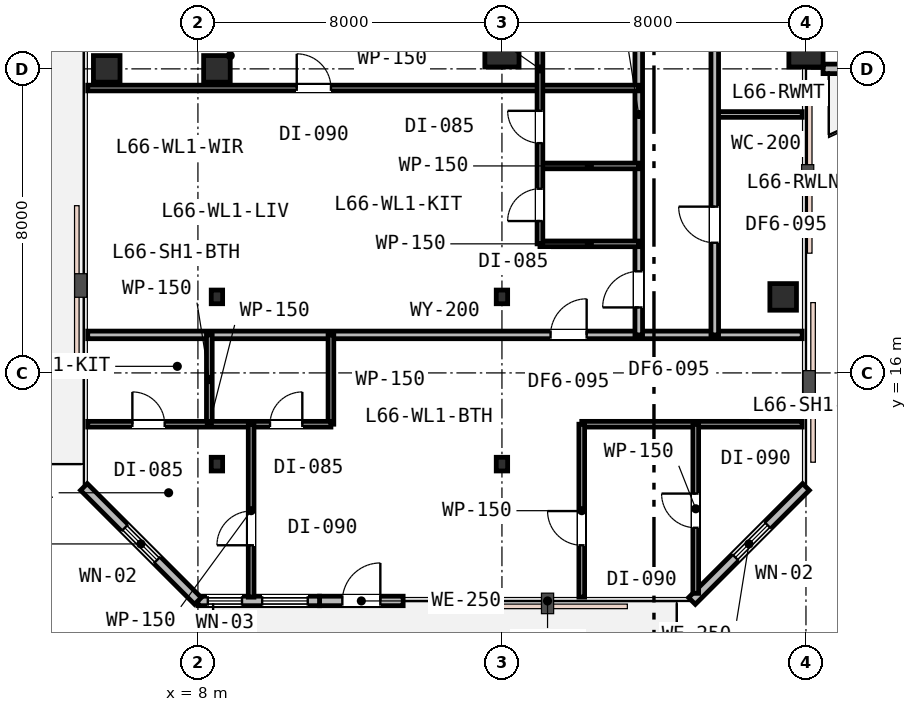
"""IFC4 building model, lengths in metres.
Left out: names, types, materials, properties, quantities, classifications, styles, units other than length and angle.
Written with IfcOpenShell. Run it as: python <this file> out.ifc"""

import sys

from ifc_helpers import new_model, si_unit, direction, frame, frame_2d, origin, origin_2d, place, context, subcontext, project, spatial, rectangle, i_section, extrude, element, fill, save


model = new_model("IFC4")
c1 = context("Model", 3, precision=1e-05, world=origin(), true_north=direction((0.0, 1.0)))
c2 = subcontext(c1, "Body", "Model", "MODEL_VIEW")
j1 = project(units=[si_unit("LENGTHUNIT", "METRE"), si_unit("PLANEANGLEUNIT", "RADIAN")], contexts=[c1])
p1 = place(None, origin())
s1 = spatial("IfcSite", under=j1, at=p1, CompositionType="ELEMENT")
p2 = place(p1, origin())
s2 = spatial("IfcBuilding", under=s1, at=p2, CompositionType="ELEMENT")
p3 = place(p2, frame((0.0, 0.0, 256.4)))
s3 = spatial("IfcBuildingStorey", under=s2, at=p3, CompositionType="ELEMENT", Elevation=256.4)
p4 = place(p3, frame((8.5, 24.0, 0.0), z_axis=(0.0, 0.0, 1.0), x_axis=(1.0, 0.0, 0.0)))
e1 = element("IfcColumn", 1, at=p4, inside=s3, PredefinedType="COLUMN", context=c2, shape_type="SweptSolid", body=[
    extrude(rectangle(XDim=0.7, YDim=0.7, at=origin_2d()), origin(), (0.0, 0.0, 1.0), 3.8),
])
for number, where, z_axis, x_axis in (
    (2, (16.0, 24.5, 0.0), (0.0, 0.0, 1.0), (1.0, 0.0, 0.0)),
    (3, (24.0, 24.5, 0.0), (0.0, 0.0, 1.0), (1.0, 0.0, 0.0)),
):
    element("IfcColumn", number, at=place(p3, frame(where, z_axis=z_axis, x_axis=x_axis)), inside=s3, PredefinedType="COLUMN", context=c2, shape_type="SweptSolid", body=[
        extrude(rectangle(XDim=0.9, YDim=0.9, at=origin_2d()), origin(), (0.0, 0.0, 1.0), 3.8),
    ])
for number, where, z_axis, x_axis in (
    (4, (5.6, 24.0, 0.0), (0.0, 0.0, 1.0), (1.0, 0.0, 0.0)),
    (5, (23.4, 18.0, 0.0), (0.0, 0.0, 1.0), (1.0, 0.0, 0.0)),
):
    element("IfcColumn", number, at=place(p3, frame(where, z_axis=z_axis, x_axis=x_axis)), inside=s3, PredefinedType="COLUMN", context=c2, shape_type="SweptSolid", body=[
        extrude(rectangle(XDim=0.7, YDim=0.7, at=origin_2d()), origin(), (0.0, 0.0, 1.0), 3.8),
    ])
for number, where, z_axis, x_axis in (
    (6, (8.5, 13.6, 0.0), (0.0, 0.0, 1.0), (1.0, 0.0, 0.0)),
    (7, (16.0, 13.6, 0.0), (0.0, 0.0, 1.0), (1.0, 0.0, 0.0)),
    (8, (8.5, 18.0, 0.0), (0.0, 0.0, 1.0), (1.0, 0.0, 0.0)),
    (9, (16.0, 18.0, 0.0), (0.0, 0.0, 1.0), (1.0, 0.0, 0.0)),
):
    element("IfcColumn", number, at=place(p3, frame(where, z_axis=z_axis, x_axis=x_axis)), inside=s3, PredefinedType="COLUMN", context=c2, shape_type="SweptSolid", body=[
        extrude(i_section(OverallWidth=0.3, OverallDepth=0.36, WebThickness=0.013, FlangeThickness=0.022, FilletRadius=0.027, at=origin_2d()), origin(), (0.0, 0.0, 1.0), 3.8),
    ])
p5 = place(p3, frame((11.2, 10.0, 0.0), z_axis=(0.0, 0.0, 1.0), x_axis=(1.0, 0.0, 0.0)))
e10 = element("IfcWall", 10, at=p5, inside=s3, PredefinedType="STANDARD", context=c2, shape_type="SweptSolid", body=[
    extrude(rectangle(XDim=2.2, YDim=0.25, at=frame_2d((1.1, 0.0))), origin(), (0.0, 0.0, 1.0), 3.53),
])
p6 = place(p5, frame((0.6, 0.0, 0.0)))
e11 = element("IfcOpeningElement", 11, at=p6, cuts=e10, PredefinedType="OPENING", context=c2, shape_type="SweptSolid", body=[
    extrude(rectangle(XDim=1.0, YDim=2.15, at=frame_2d((0.5, 1.075))), frame((0.0, 0.135, 0.0), z_axis=(0.0, -1.0, 0.0), x_axis=(1.0, 0.0, 0.0)), (0.0, 0.0, 1.0), 0.27),
])
p7 = place(p3, frame((8.0, 10.0, 0.0), z_axis=(0.0, 0.0, 1.0), x_axis=(1.0, 0.0, 0.0)))
e12 = element("IfcWall", 12, at=p7, inside=s3, PredefinedType="STANDARD", context=c2, shape_type="SweptSolid", body=[
    extrude(rectangle(XDim=3.2, YDim=0.25, at=frame_2d((1.6, 0.0))), origin(), (0.0, 0.0, 1.0), 3.53),
])
p8 = place(p7, frame((0.26, 0.0, 0.9)))
e13 = element("IfcOpeningElement", 13, at=p8, cuts=e12, PredefinedType="OPENING", context=c2, shape_type="SweptSolid", body=[
    extrude(rectangle(XDim=0.9, YDim=1.55, at=frame_2d((0.45, 0.775))), frame((0.0, 0.135, 0.0), z_axis=(0.0, -1.0, 0.0), x_axis=(1.0, 0.0, 0.0)), (0.0, 0.0, 1.0), 0.27),
])
p9 = place(p7, frame((1.69, 0.0, 0.85)))
e14 = element("IfcOpeningElement", 14, at=p9, cuts=e12, PredefinedType="OPENING", context=c2, shape_type="SweptSolid", body=[
    extrude(rectangle(XDim=1.2, YDim=1.6, at=frame_2d((0.6, 0.8))), frame((0.0, 0.135, 0.0), z_axis=(0.0, -1.0, 0.0), x_axis=(1.0, 0.0, 0.0)), (0.0, 0.0, 1.0), 0.27),
])
p10 = place(p3, frame((21.0, 10.0, 0.0), z_axis=(0.0, 0.0, 1.0), x_axis=(0.707106781187, 0.707106781187, 0.0)))
e15 = element("IfcWall", 15, at=p10, inside=s3, PredefinedType="STANDARD", context=c2, shape_type="SweptSolid", body=[
    extrude(rectangle(XDim=4.243, YDim=0.25, at=frame_2d((2.121, 0.0))), origin(), (0.0, 0.0, 1.0), 3.53),
])
p11 = place(p10, frame((1.617, 0.0, 0.85)))
e16 = element("IfcOpeningElement", 16, at=p11, cuts=e15, PredefinedType="OPENING", context=c2, shape_type="SweptSolid", body=[
    extrude(rectangle(XDim=1.2, YDim=1.6, at=frame_2d((0.6, 0.8))), frame((0.0, 0.135, 0.0), z_axis=(0.0, -1.0, 0.0), x_axis=(1.0, 0.0, 0.0)), (0.0, 0.0, 1.0), 0.27),
])
p12 = place(p3, frame((24.45, 24.0, 0.0), z_axis=(0.0, 0.0, 1.0), x_axis=(1.0, 0.0, 0.0)))
e17 = element("IfcWall", 17, at=p12, inside=s3, PredefinedType="STANDARD", context=c2, shape_type="SweptSolid", body=[
    extrude(rectangle(XDim=0.95, YDim=0.25, at=frame_2d((0.475, 0.0))), origin(), (0.0, 0.0, 1.0), 3.27),
])
p13 = place(p3, frame((5.0, 13.0, 0.0), z_axis=(0.0, 0.0, 1.0), x_axis=(0.707106781187, -0.707106781187, 0.0)))
e18 = element("IfcWall", 18, at=p13, inside=s3, PredefinedType="STANDARD", context=c2, shape_type="SweptSolid", body=[
    extrude(rectangle(XDim=4.243, YDim=0.25, at=frame_2d((2.121, 0.0))), origin(), (0.0, 0.0, 1.0), 3.53),
])
p14 = place(p13, frame((1.521, 0.0, 0.85)))
e19 = element("IfcOpeningElement", 19, at=p14, cuts=e18, PredefinedType="OPENING", context=c2, shape_type="SweptSolid", body=[
    extrude(rectangle(XDim=1.2, YDim=1.6, at=frame_2d((0.6, 0.8))), frame((0.0, 0.135, 0.0), z_axis=(0.0, -1.0, 0.0), x_axis=(1.0, 0.0, 0.0)), (0.0, 0.0, 1.0), 0.27),
])
p15 = place(p3, frame((5.1, 17.0, 0.0), z_axis=(0.0, 0.0, 1.0), x_axis=(1.0, 0.0, 0.0)))
e20 = element("IfcWall", 20, at=p15, inside=s3, PredefinedType="PARTITIONING", context=c2, shape_type="SweptSolid", body=[
    extrude(rectangle(XDim=18.8, YDim=0.2, at=frame_2d((9.4, 0.0))), origin(), (0.0, 0.0, 1.0), 3.16),
])
p16 = place(p15, frame((12.179, 0.0, 0.0)))
e21 = element("IfcOpeningElement", 21, at=p16, cuts=e20, PredefinedType="OPENING", context=c2, shape_type="SweptSolid", body=[
    extrude(rectangle(XDim=0.95, YDim=2.15, at=frame_2d((0.475, 1.075))), frame((0.0, 0.11, 0.0), z_axis=(0.0, -1.0, 0.0), x_axis=(1.0, 0.0, 0.0)), (0.0, 0.0, 1.0), 0.22),
])
p17 = place(p3, frame((19.6, 17.0, 0.0), z_axis=(0.0, 0.0, 1.0), x_axis=(0.0, 1.0, 0.0)))
e22 = element("IfcWall", 22, at=p17, inside=s3, PredefinedType="PARTITIONING", context=c2, shape_type="SweptSolid", body=[
    extrude(rectangle(XDim=11.6, YDim=0.2, at=frame_2d((5.8, 0.0))), origin(), (0.0, 0.0, 1.0), 3.16),
])
p18 = place(p17, frame((0.723, 0.0, 0.0)))
e23 = element("IfcOpeningElement", 23, at=p18, cuts=e22, PredefinedType="OPENING", context=c2, shape_type="SweptSolid", body=[
    extrude(rectangle(XDim=0.95, YDim=2.15, at=frame_2d((0.475, 1.075))), frame((0.0, 0.11, 0.0), z_axis=(0.0, -1.0, 0.0), x_axis=(1.0, 0.0, 0.0)), (0.0, 0.0, 1.0), 0.22),
])
for number, where, z_axis, x_axis in (
    (24, (17.0, 19.396, 0.0), (0.0, 0.0, 1.0), (1.0, 0.0, 0.0)),
    (25, (17.0, 21.446, 0.0), (0.0, 0.0, 1.0), (1.0, 0.0, 0.0)),
):
    element("IfcWall", number, at=place(p3, frame(where, z_axis=z_axis, x_axis=x_axis)), inside=s3, PredefinedType="PARTITIONING", context=c2, shape_type="SweptSolid", body=[
        extrude(rectangle(XDim=2.6, YDim=0.15, at=frame_2d((1.3, 0.0))), origin(), (0.0, 0.0, 1.0), 3.53),
    ])
p19 = place(p3, frame((5.1, 23.496, 0.0), z_axis=(0.0, 0.0, 1.0), x_axis=(1.0, 0.0, 0.0)))
e26 = element("IfcWall", 26, at=p19, inside=s3, PredefinedType="PARTITIONING", context=c2, shape_type="SweptSolid", body=[
    extrude(rectangle(XDim=14.5, YDim=0.15, at=frame_2d((7.25, 0.0))), origin(), (0.0, 0.0, 1.0), 3.16),
])
p20 = place(p19, frame((5.5, 0.0, 0.0)))
e27 = element("IfcOpeningElement", 27, at=p20, cuts=e26, PredefinedType="OPENING", context=c2, shape_type="SweptSolid", body=[
    extrude(rectangle(XDim=0.9, YDim=2.15, at=frame_2d((0.45, 1.075))), frame((0.0, 0.085, 0.0), z_axis=(0.0, -1.0, 0.0), x_axis=(1.0, 0.0, 0.0)), (0.0, 0.0, 1.0), 0.17),
])
p21 = place(p3, frame((17.0, 19.396, 0.0), z_axis=(0.0, 0.0, 1.0), x_axis=(0.0, 1.0, 0.0)))
e28 = element("IfcWall", 28, at=p21, inside=s3, PredefinedType="PARTITIONING", context=c2, shape_type="SweptSolid", body=[
    extrude(rectangle(XDim=9.204, YDim=0.15, at=frame_2d((4.602, 0.0))), origin(), (0.0, 0.0, 1.0), 3.16),
])
p22 = place(p21, frame((0.6, 0.0, 0.0)))
e29 = element("IfcOpeningElement", 29, at=p22, cuts=e28, PredefinedType="OPENING", context=c2, shape_type="SweptSolid", body=[
    extrude(rectangle(XDim=0.85, YDim=2.15, at=frame_2d((0.425, 1.075))), frame((0.0, 0.085, 0.0), z_axis=(0.0, -1.0, 0.0), x_axis=(1.0, 0.0, 0.0)), (0.0, 0.0, 1.0), 0.17),
])
p23 = place(p21, frame((2.65, 0.0, 0.0)))
e30 = element("IfcOpeningElement", 30, at=p23, cuts=e28, PredefinedType="OPENING", context=c2, shape_type="SweptSolid", body=[
    extrude(rectangle(XDim=0.85, YDim=2.15, at=frame_2d((0.425, 1.075))), frame((0.0, 0.085, 0.0), z_axis=(0.0, -1.0, 0.0), x_axis=(1.0, 0.0, 0.0)), (0.0, 0.0, 1.0), 0.17),
])
p24 = place(p21, frame((6.593, 0.0, 0.0)))
e31 = element("IfcOpeningElement", 31, at=p24, cuts=e28, PredefinedType="OPENING", context=c2, shape_type="SweptSolid", body=[
    extrude(rectangle(XDim=0.85, YDim=2.15, at=frame_2d((0.425, 1.075))), frame((0.0, 0.085, 0.0), z_axis=(0.0, -1.0, 0.0), x_axis=(1.0, 0.0, 0.0)), (0.0, 0.0, 1.0), 0.17),
])
p25 = place(p3, frame((21.6, 22.8, 0.0), z_axis=(0.0, 0.0, 1.0), x_axis=(1.0, 0.0, 0.0)))
e32 = element("IfcWall", 32, at=p25, inside=s3, PredefinedType="PARTITIONING", context=c2, shape_type="SweptSolid", body=[
    extrude(rectangle(XDim=2.3, YDim=0.15, at=frame_2d((1.15, 0.0))), origin(), (0.0, 0.0, 1.0), 3.53),
])
p26 = place(p3, frame((21.6, 17.0, 0.0), z_axis=(0.0, 0.0, 1.0), x_axis=(0.0, 1.0, 0.0)))
e33 = element("IfcWall", 33, at=p26, inside=s3, PredefinedType="PARTITIONING", context=c2, shape_type="SweptSolid", body=[
    extrude(rectangle(XDim=11.6, YDim=0.2, at=frame_2d((5.8, 0.0))), origin(), (0.0, 0.0, 1.0), 3.16),
])
p27 = place(p26, frame((8.994, 0.0, 0.0)))
e34 = element("IfcOpeningElement", 34, at=p27, cuts=e33, PredefinedType="OPENING", context=c2, shape_type="SweptSolid", body=[
    extrude(rectangle(XDim=0.95, YDim=2.15, at=frame_2d((0.475, 1.075))), frame((0.0, 0.11, 0.0), z_axis=(0.0, -1.0, 0.0), x_axis=(1.0, 0.0, 0.0)), (0.0, 0.0, 1.0), 0.22),
])
p28 = place(p26, frame((2.425, 0.0, 0.0)))
e35 = element("IfcOpeningElement", 35, at=p28, cuts=e33, PredefinedType="OPENING", context=c2, shape_type="SweptSolid", body=[
    extrude(rectangle(XDim=0.95, YDim=2.15, at=frame_2d((0.475, 1.075))), frame((0.0, 0.11, 0.0), z_axis=(0.0, -1.0, 0.0), x_axis=(1.0, 0.0, 0.0)), (0.0, 0.0, 1.0), 0.22),
])
p29 = place(p3, frame((11.5, 14.65, 0.0), z_axis=(0.0, 0.0, 1.0), x_axis=(0.0, 1.0, 0.0)))
e36 = element("IfcWall", 36, at=p29, inside=s3, PredefinedType="PARTITIONING", context=c2, shape_type="SweptSolid", body=[
    extrude(rectangle(XDim=2.35, YDim=0.15, at=frame_2d((1.175, 0.0))), origin(), (0.0, 0.0, 1.0), 3.28),
])
p30 = place(p3, frame((8.3, 14.65, 0.0), z_axis=(0.0, 0.0, 1.0), x_axis=(0.0, 1.0, 0.0)))
e37 = element("IfcWall", 37, at=p30, inside=s3, PredefinedType="PARTITIONING", context=c2, shape_type="SweptSolid", body=[
    extrude(rectangle(XDim=2.35, YDim=0.15, at=frame_2d((1.175, 0.0))), origin(), (0.0, 0.0, 1.0), 3.16),
])
p31 = place(p3, frame((5.1, 14.65, 0.0), z_axis=(0.0, 0.0, 1.0), x_axis=(1.0, 0.0, 0.0)))
e38 = element("IfcWall", 38, at=p31, inside=s3, PredefinedType="PARTITIONING", context=c2, shape_type="SweptSolid", body=[
    extrude(rectangle(XDim=6.4, YDim=0.15, at=frame_2d((3.2, 0.0))), origin(), (0.0, 0.0, 1.0), 3.16),
])
p32 = place(p31, frame((1.175, 0.0, 0.0)))
e39 = element("IfcOpeningElement", 39, at=p32, cuts=e38, PredefinedType="OPENING", context=c2, shape_type="SweptSolid", body=[
    extrude(rectangle(XDim=0.85, YDim=2.15, at=frame_2d((0.425, 1.075))), frame((0.0, 0.085, 0.0), z_axis=(0.0, -1.0, 0.0), x_axis=(1.0, 0.0, 0.0)), (0.0, 0.0, 1.0), 0.17),
])
p33 = place(p31, frame((4.797, 0.0, 0.0)))
e40 = element("IfcOpeningElement", 40, at=p33, cuts=e38, PredefinedType="OPENING", context=c2, shape_type="SweptSolid", body=[
    extrude(rectangle(XDim=0.85, YDim=2.15, at=frame_2d((0.425, 1.075))), frame((0.0, 0.085, 0.0), z_axis=(0.0, -1.0, 0.0), x_axis=(1.0, 0.0, 0.0)), (0.0, 0.0, 1.0), 0.17),
])
p34 = place(p3, frame((18.1, 14.65, 0.0), z_axis=(0.0, 0.0, 1.0), x_axis=(1.0, 0.0, 0.0)))
e41 = element("IfcWall", 41, at=p34, inside=s3, PredefinedType="PARTITIONING", context=c2, shape_type="SweptSolid", body=[
    extrude(rectangle(XDim=5.8, YDim=0.15, at=frame_2d((2.9, 0.0))), origin(), (0.0, 0.0, 1.0), 3.53),
])
p35 = place(p3, frame((9.4, 10.1, 0.0), z_axis=(0.0, 0.0, 1.0), x_axis=(0.0, 1.0, 0.0)))
e42 = element("IfcWall", 42, at=p35, inside=s3, PredefinedType="PARTITIONING", context=c2, shape_type="SweptSolid", body=[
    extrude(rectangle(XDim=4.55, YDim=0.15, at=frame_2d((2.275, 0.0))), origin(), (0.0, 0.0, 1.0), 3.16),
])
p36 = place(p35, frame((1.365, 0.0, 0.0)))
e43 = element("IfcOpeningElement", 43, at=p36, cuts=e42, PredefinedType="OPENING", context=c2, shape_type="SweptSolid", body=[
    extrude(rectangle(XDim=0.9, YDim=2.15, at=frame_2d((0.45, 1.075))), frame((0.0, 0.085, 0.0), z_axis=(0.0, -1.0, 0.0), x_axis=(1.0, 0.0, 0.0)), (0.0, 0.0, 1.0), 0.17),
])
p37 = place(p3, frame((21.1, 10.2, 0.0), z_axis=(0.0, 0.0, 1.0), x_axis=(0.0, 1.0, 0.0)))
e44 = element("IfcWall", 44, at=p37, inside=s3, PredefinedType="PARTITIONING", context=c2, shape_type="SweptSolid", body=[
    extrude(rectangle(XDim=4.45, YDim=0.15, at=frame_2d((2.225, 0.0))), origin(), (0.0, 0.0, 1.0), 3.53),
])
p38 = place(p37, frame((1.725, 0.0, 0.0)))
e45 = element("IfcOpeningElement", 45, at=p38, cuts=e44, PredefinedType="OPENING", context=c2, shape_type="SweptSolid", body=[
    extrude(rectangle(XDim=0.9, YDim=2.15, at=frame_2d((0.45, 1.075))), frame((0.0, 0.085, 0.0), z_axis=(0.0, -1.0, 0.0), x_axis=(1.0, 0.0, 0.0)), (0.0, 0.0, 1.0), 0.17),
])
p39 = place(p3, frame((18.1, 10.1, 0.0), z_axis=(0.0, 0.0, 1.0), x_axis=(0.0, 1.0, 0.0)))
e46 = element("IfcWall", 46, at=p39, inside=s3, PredefinedType="PARTITIONING", context=c2, shape_type="SweptSolid", body=[
    extrude(rectangle(XDim=4.55, YDim=0.15, at=frame_2d((2.275, 0.0))), origin(), (0.0, 0.0, 1.0), 3.53),
])
p40 = place(p39, frame((1.365, 0.0, 0.0)))
e47 = element("IfcOpeningElement", 47, at=p40, cuts=e46, PredefinedType="OPENING", context=c2, shape_type="SweptSolid", body=[
    extrude(rectangle(XDim=0.9, YDim=2.15, at=frame_2d((0.45, 1.075))), frame((0.0, 0.085, 0.0), z_axis=(0.0, -1.0, 0.0), x_axis=(1.0, 0.0, 0.0)), (0.0, 0.0, 1.0), 0.17),
])
p41 = place(p6, origin())
e48 = element("IfcDoor", 48, at=p41, inside=s3, OperationType="SINGLE_SWING_RIGHT", PredefinedType="DOOR", context=c2, shape_type="SweptSolid", body=[
    extrude(rectangle(XDim=1.0, YDim=2.15, at=frame_2d((0.5, 1.075))), frame((0.0, 0.025, 0.0), z_axis=(0.0, -1.0, 0.0), x_axis=(1.0, 0.0, 0.0)), (0.0, 0.0, 1.0), 0.05),
])
fill(e11, e48)
p42 = place(p8, origin())
e49 = element("IfcWindow", 49, at=p42, inside=s3, PartitioningType="SINGLE_PANEL", PredefinedType="WINDOW", context=c2, shape_type="SweptSolid", body=[
    extrude(rectangle(XDim=0.9, YDim=1.55, at=frame_2d((0.45, 0.775))), frame((0.0, 0.03, 0.0), z_axis=(0.0, -1.0, 0.0), x_axis=(1.0, 0.0, 0.0)), (0.0, 0.0, 1.0), 0.06),
])
fill(e13, e49)
p43 = place(p9, origin())
e50 = element("IfcWindow", 50, at=p43, inside=s3, PartitioningType="SINGLE_PANEL", PredefinedType="WINDOW", context=c2, shape_type="SweptSolid", body=[
    extrude(rectangle(XDim=1.2, YDim=1.6, at=frame_2d((0.6, 0.8))), frame((0.0, 0.03, 0.0), z_axis=(0.0, -1.0, 0.0), x_axis=(1.0, 0.0, 0.0)), (0.0, 0.0, 1.0), 0.06),
])
fill(e14, e50)
p44 = place(p11, origin())
e51 = element("IfcWindow", 51, at=p44, inside=s3, PartitioningType="SINGLE_PANEL", PredefinedType="WINDOW", context=c2, shape_type="SweptSolid", body=[
    extrude(rectangle(XDim=1.2, YDim=1.6, at=frame_2d((0.6, 0.8))), frame((0.0, 0.03, 0.0), z_axis=(0.0, -1.0, 0.0), x_axis=(1.0, 0.0, 0.0)), (0.0, 0.0, 1.0), 0.06),
])
fill(e16, e51)
p45 = place(p14, origin())
e52 = element("IfcWindow", 52, at=p45, inside=s3, PartitioningType="SINGLE_PANEL", PredefinedType="WINDOW", context=c2, shape_type="SweptSolid", body=[
    extrude(rectangle(XDim=1.2, YDim=1.6, at=frame_2d((0.6, 0.8))), frame((0.0, 0.03, 0.0), z_axis=(0.0, -1.0, 0.0), x_axis=(1.0, 0.0, 0.0)), (0.0, 0.0, 1.0), 0.06),
])
fill(e19, e52)
p46 = place(p18, origin())
e53 = element("IfcDoor", 53, at=p46, inside=s3, OperationType="SINGLE_SWING_LEFT", PredefinedType="DOOR", context=c2, shape_type="SweptSolid", body=[
    extrude(rectangle(XDim=0.95, YDim=2.15, at=frame_2d((0.475, 1.075))), frame((0.0, 0.025, 0.0), z_axis=(0.0, -1.0, 0.0), x_axis=(1.0, 0.0, 0.0)), (0.0, 0.0, 1.0), 0.05),
])
fill(e23, e53)
p47 = place(p22, origin())
e54 = element("IfcDoor", 54, at=p47, inside=s3, OperationType="SINGLE_SWING_LEFT", PredefinedType="DOOR", context=c2, shape_type="SweptSolid", body=[
    extrude(rectangle(XDim=0.85, YDim=2.15, at=frame_2d((0.425, 1.075))), frame((0.0, 0.025, 0.0), z_axis=(0.0, -1.0, 0.0), x_axis=(1.0, 0.0, 0.0)), (0.0, 0.0, 1.0), 0.05),
])
fill(e29, e54)
p48 = place(p23, origin())
e55 = element("IfcDoor", 55, at=p48, inside=s3, OperationType="SINGLE_SWING_RIGHT", PredefinedType="DOOR", context=c2, shape_type="SweptSolid", body=[
    extrude(rectangle(XDim=0.85, YDim=2.15, at=frame_2d((0.425, 1.075))), frame((0.0, 0.025, 0.0), z_axis=(0.0, -1.0, 0.0), x_axis=(1.0, 0.0, 0.0)), (0.0, 0.0, 1.0), 0.05),
])
fill(e30, e55)
p49 = place(p20, origin())
e56 = element("IfcDoor", 56, at=p49, inside=s3, OperationType="SINGLE_SWING_LEFT", PredefinedType="DOOR", context=c2, shape_type="SweptSolid", body=[
    extrude(rectangle(XDim=0.9, YDim=2.15, at=frame_2d((0.45, 1.075))), frame((0.0, 0.025, 0.0), z_axis=(0.0, -1.0, 0.0), x_axis=(1.0, 0.0, 0.0)), (0.0, 0.0, 1.0), 0.05),
])
fill(e27, e56)
p50 = place(p28, origin())
e57 = element("IfcDoor", 57, at=p50, inside=s3, OperationType="SINGLE_SWING_RIGHT", PredefinedType="DOOR", context=c2, shape_type="SweptSolid", body=[
    extrude(rectangle(XDim=0.95, YDim=2.15, at=frame_2d((0.475, 1.075))), frame((0.0, 0.025, 0.0), z_axis=(0.0, -1.0, 0.0), x_axis=(1.0, 0.0, 0.0)), (0.0, 0.0, 1.0), 0.05),
])
fill(e35, e57)
p51 = place(p16, origin())
e58 = element("IfcDoor", 58, at=p51, inside=s3, OperationType="SINGLE_SWING_RIGHT", PredefinedType="DOOR", context=c2, shape_type="SweptSolid", body=[
    extrude(rectangle(XDim=0.95, YDim=2.15, at=frame_2d((0.475, 1.075))), frame((0.0, 0.025, 0.0), z_axis=(0.0, -1.0, 0.0), x_axis=(1.0, 0.0, 0.0)), (0.0, 0.0, 1.0), 0.05),
])
fill(e21, e58)
p52 = place(p32, origin())
e59 = element("IfcDoor", 59, at=p52, inside=s3, OperationType="SINGLE_SWING_LEFT", PredefinedType="DOOR", context=c2, shape_type="SweptSolid", body=[
    extrude(rectangle(XDim=0.85, YDim=2.15, at=frame_2d((0.425, 1.075))), frame((0.0, 0.025, 0.0), z_axis=(0.0, -1.0, 0.0), x_axis=(1.0, 0.0, 0.0)), (0.0, 0.0, 1.0), 0.05),
])
fill(e39, e59)
p53 = place(p33, origin())
e60 = element("IfcDoor", 60, at=p53, inside=s3, OperationType="SINGLE_SWING_RIGHT", PredefinedType="DOOR", context=c2, shape_type="SweptSolid", body=[
    extrude(rectangle(XDim=0.85, YDim=2.15, at=frame_2d((0.425, 1.075))), frame((0.0, 0.025, 0.0), z_axis=(0.0, -1.0, 0.0), x_axis=(1.0, 0.0, 0.0)), (0.0, 0.0, 1.0), 0.05),
])
fill(e40, e60)
p54 = place(p36, origin())
e61 = element("IfcDoor", 61, at=p54, inside=s3, OperationType="SINGLE_SWING_LEFT", PredefinedType="DOOR", context=c2, shape_type="SweptSolid", body=[
    extrude(rectangle(XDim=0.9, YDim=2.15, at=frame_2d((0.45, 1.075))), frame((0.0, 0.025, 0.0), z_axis=(0.0, -1.0, 0.0), x_axis=(1.0, 0.0, 0.0)), (0.0, 0.0, 1.0), 0.05),
])
fill(e43, e61)
p55 = place(p38, origin())
e62 = element("IfcDoor", 62, at=p55, inside=s3, OperationType="SINGLE_SWING_RIGHT", PredefinedType="DOOR", context=c2, shape_type="SweptSolid", body=[
    extrude(rectangle(XDim=0.9, YDim=2.15, at=frame_2d((0.45, 1.075))), frame((0.0, 0.025, 0.0), z_axis=(0.0, -1.0, 0.0), x_axis=(1.0, 0.0, 0.0)), (0.0, 0.0, 1.0), 0.05),
])
fill(e45, e62)
p56 = place(p40, origin())
e63 = element("IfcDoor", 63, at=p56, inside=s3, OperationType="SINGLE_SWING_RIGHT", PredefinedType="DOOR", context=c2, shape_type="SweptSolid", body=[
    extrude(rectangle(XDim=0.9, YDim=2.15, at=frame_2d((0.45, 1.075))), frame((0.0, 0.025, 0.0), z_axis=(0.0, -1.0, 0.0), x_axis=(1.0, 0.0, 0.0)), (0.0, 0.0, 1.0), 0.05),
])
fill(e47, e63)
save(model, sys.argv[1])
